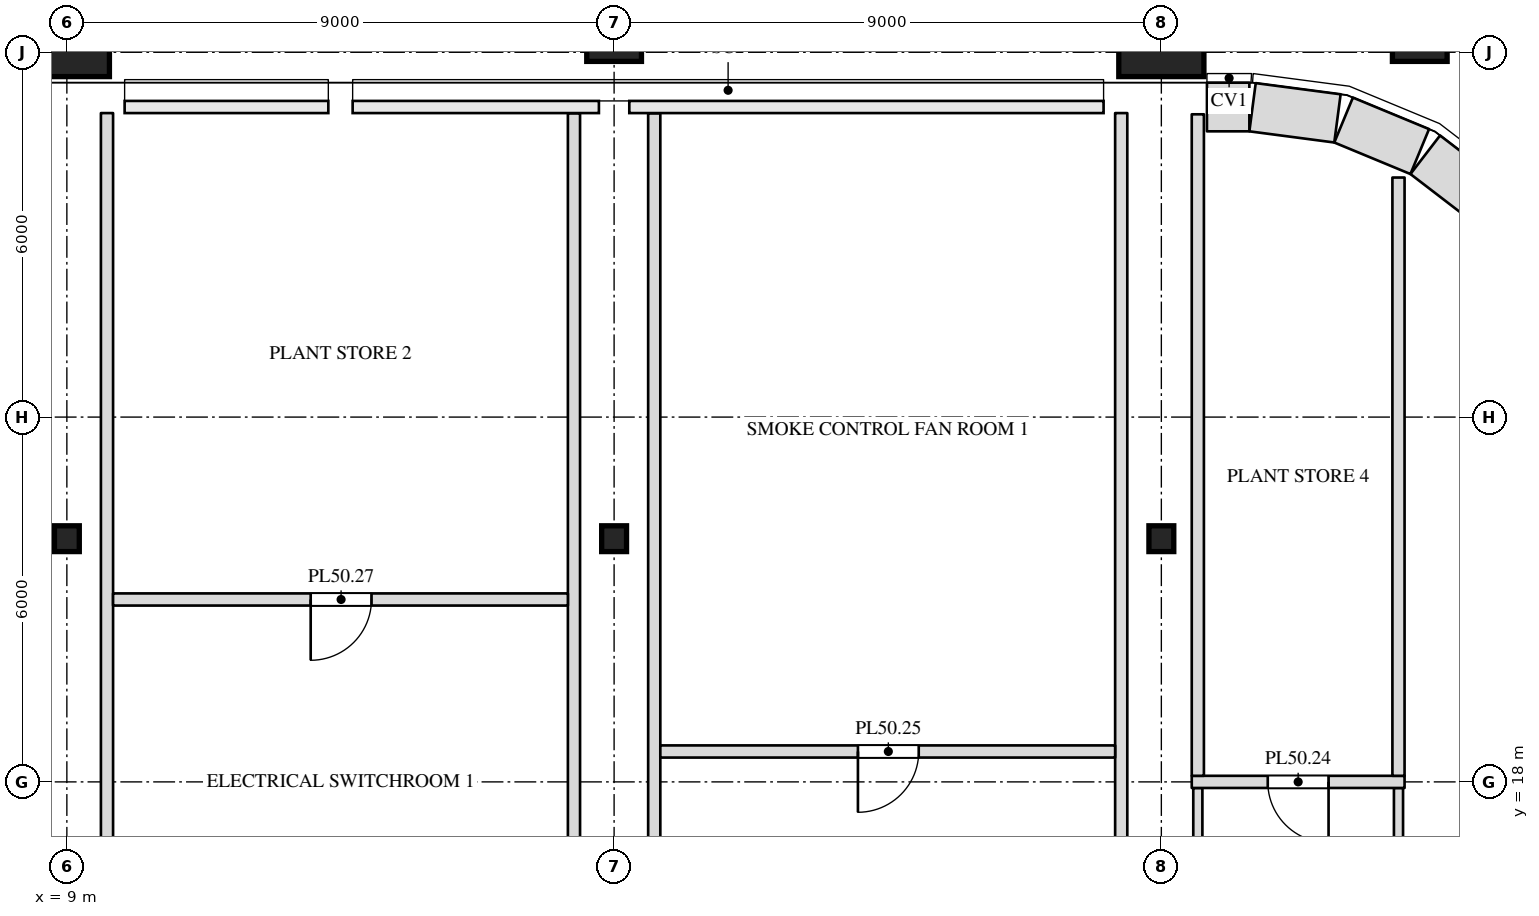
"""IFC4 building model, lengths in metres.
Left out: names, types, materials, properties, quantities, classifications, styles, units other than length and angle.
Written with IfcOpenShell. Run it as: python <this file> out.ifc"""

import sys

from ifc_helpers import new_model, si_unit, direction, frame, frame_2d, origin, origin_2d, place, context, subcontext, project, spatial, rectangle, i_section, extrude, clip, halfspace, element, fill, save


model = new_model("IFC4")
c1 = context("Model", 3, precision=1e-05, world=origin(), true_north=direction((0.0, 1.0)))
c2 = subcontext(c1, "Body", "Model", "MODEL_VIEW")
j1 = project(units=[si_unit("LENGTHUNIT", "METRE"), si_unit("PLANEANGLEUNIT", "RADIAN")], contexts=[c1])
p1 = place(None, origin())
s1 = spatial("IfcSite", under=j1, at=p1, CompositionType="ELEMENT")
p2 = place(p1, origin())
s2 = spatial("IfcBuilding", under=s1, at=p2, CompositionType="ELEMENT")
p3 = place(p2, frame((0.0, 0.0, 216.5)))
s3 = spatial("IfcBuildingStorey", under=s2, at=p3, CompositionType="ELEMENT", Elevation=216.5)
for number, where, z_axis, x_axis in (
    (1, (9.0, 22.0, 0.0), (0.0, 0.0, 1.0), (1.0, 0.0, 0.0)),
    (2, (18.0, 22.0, 0.0), (0.0, 0.0, 1.0), (1.0, 0.0, 0.0)),
    (3, (27.0, 22.0, 0.0), (0.0, 0.0, 1.0), (1.0, 0.0, 0.0)),
):
    element("IfcColumn", number, at=place(p3, frame(where, z_axis=z_axis, x_axis=x_axis)), inside=s3, PredefinedType="COLUMN", context=c2, shape_type="SweptSolid", body=[
        extrude(i_section(OverallWidth=0.409, OverallDepth=0.424, WebThickness=0.033, FlangeThickness=0.052, at=origin_2d()), origin(), (0.0, 0.0, 1.0), 4.0),
    ])
p4 = place(p3, frame((9.0, 30.0, 0.0), z_axis=(0.0, 0.242535625036, 0.970142500145), x_axis=(-1.0, 0.0, 0.0)))
e4 = element("IfcColumn", 4, at=p4, inside=s3, PredefinedType="COLUMN", context=c2, shape_type="Clipping", body=[
    clip(extrude(rectangle(XDim=1.4, YDim=1.4, at=origin_2d()), origin(), (0.0, 0.0, 1.0), 4.123), halfspace(frame((0.0, 0.0, 3.948)), False)),
])
p5 = place(p3, frame((18.0, 30.0, 0.0), z_axis=(0.0, 0.242535625036, 0.970142500145), x_axis=(-1.0, 0.0, 0.0)))
e5 = element("IfcColumn", 5, at=p5, inside=s3, PredefinedType="COLUMN", context=c2, shape_type="Clipping", body=[
    clip(extrude(rectangle(XDim=0.9, YDim=0.9, at=origin_2d()), origin(), (0.0, 0.0, 1.0), 4.123), halfspace(frame((0.0, 0.0, 4.01)), False)),
])
p6 = place(p3, frame((27.0, 30.0, 0.0), z_axis=(0.0, 0.242535625036, 0.970142500145), x_axis=(-1.0, 0.0, 0.0)))
e6 = element("IfcColumn", 6, at=p6, inside=s3, PredefinedType="COLUMN", context=c2, shape_type="Clipping", body=[
    clip(extrude(rectangle(XDim=1.4, YDim=1.4, at=origin_2d()), origin(), (0.0, 0.0, 1.0), 4.123), halfspace(frame((0.0, 0.0, 3.948)), False)),
])
p7 = place(p3, frame((31.25, 30.0, 0.0), z_axis=(0.0, 0.242535625036, 0.970142500145), x_axis=(-1.0, 0.0, 0.0)))
e7 = element("IfcColumn", 7, at=p7, inside=s3, PredefinedType="COLUMN", context=c2, shape_type="Clipping", body=[
    clip(extrude(rectangle(XDim=0.9, YDim=0.9, at=origin_2d()), origin(), (0.0, 0.0, 1.0), 4.123), halfspace(frame((0.0, 0.0, 4.01)), False)),
])
p8 = place(p3, frame((9.66, 0.5, 0.0), z_axis=(0.0, 0.0, 1.0), x_axis=(0.0, 1.0, 0.0)))
e8 = element("IfcWall", 8, at=p8, inside=s3, PredefinedType="PARTITIONING", context=c2, shape_type="SweptSolid", body=[
    extrude(rectangle(XDim=28.5, YDim=0.2, at=frame_2d((14.25, 0.0))), origin(), (0.0, 0.0, 1.0), 3.8),
])
for number, where, z_axis, x_axis in (
    (9, (17.34, 0.5, 0.0), (0.0, 0.0, 1.0), (0.0, 1.0, 0.0)),
    (10, (18.66, 0.5, 0.0), (0.0, 0.0, 1.0), (0.0, 1.0, 0.0)),
):
    element("IfcWall", number, at=place(p3, frame(where, z_axis=z_axis, x_axis=x_axis)), inside=s3, PredefinedType="PARTITIONING", context=c2, shape_type="SweptSolid", body=[
        extrude(rectangle(XDim=28.496, YDim=0.2, at=frame_2d((14.248, 0.0))), origin(), (0.0, 0.0, 1.0), 3.8),
    ])
p9 = place(p3, frame((26.34, 0.5, 0.0), z_axis=(0.0, 0.0, 1.0), x_axis=(0.0, 1.0, 0.0)))
e11 = element("IfcWall", 11, at=p9, inside=s3, PredefinedType="PARTITIONING", context=c2, shape_type="SweptSolid", body=[
    extrude(rectangle(XDim=28.5, YDim=0.2, at=frame_2d((14.25, 0.0))), origin(), (0.0, 0.0, 1.0), 3.8),
])
for number, where, z_axis, x_axis in (
    (12, (27.6, 0.475, 0.0), (0.0, 0.0, 1.0), (0.0, 1.0, 0.0)),
    (13, (30.9, 0.475, 0.0), (0.0, 0.0, 1.0), (0.0, 1.0, 0.0)),
):
    element("IfcWall", number, at=place(p3, frame(where, z_axis=z_axis, x_axis=x_axis)), inside=s3, PredefinedType="PARTITIONING", context=c2, shape_type="SweptSolid", body=[
        extrude(rectangle(XDim=17.425, YDim=0.15, at=frame_2d((8.712, 0.0))), origin(), (0.0, 0.0, 1.0), 3.8),
    ])
p10 = place(p3, frame((27.5, 18.0, 0.0), z_axis=(0.0, 0.0, 1.0), x_axis=(1.0, 0.0, 0.0)))
e14 = element("IfcWall", 14, at=p10, inside=s3, PredefinedType="PARTITIONING", context=c2, shape_type="SweptSolid", body=[
    extrude(rectangle(XDim=3.5, YDim=0.2, at=frame_2d((1.75, 0.0))), origin(), (0.0, 0.0, 1.0), 3.2),
])
p11 = place(p10, frame((1.25, 0.0, 0.0)))
e15 = element("IfcOpeningElement", 15, at=p11, cuts=e14, PredefinedType="OPENING", context=c2, shape_type="SweptSolid", body=[
    extrude(rectangle(XDim=1.0, YDim=2.1, at=frame_2d((0.5, 1.05))), frame((0.0, 0.112, 0.0), z_axis=(0.0, -1.0, 0.0), x_axis=(1.0, 0.0, 0.0)), (0.0, 0.0, 1.0), 0.224),
])
p12 = place(p3, frame((27.6, 18.1, 0.0), z_axis=(0.0, 0.0, 1.0), x_axis=(0.0, 1.0, 0.0)))
e16 = element("IfcWall", 16, at=p12, inside=s3, PredefinedType="PARTITIONING", context=c2, shape_type="SweptSolid", body=[
    extrude(rectangle(XDim=10.88, YDim=0.2, at=frame_2d((5.44, 0.0))), origin(), (0.0, 0.0, 1.0), 3.8),
])
p13 = place(p3, frame((30.9, 18.1, 0.0), z_axis=(0.0, 0.0, 1.0), x_axis=(0.0, 1.0, 0.0)))
e17 = element("IfcWall", 17, at=p13, inside=s3, PredefinedType="PARTITIONING", context=c2, shape_type="SweptSolid", body=[
    extrude(rectangle(XDim=9.84, YDim=0.2, at=frame_2d((4.92, 0.0))), origin(), (0.0, 0.0, 1.0), 3.8),
])
p14 = place(p3, frame((18.76, 18.5, 0.0), z_axis=(0.0, 0.0, 1.0), x_axis=(1.0, 0.0, 0.0)))
e18 = element("IfcWall", 18, at=p14, inside=s3, PredefinedType="PARTITIONING", context=c2, shape_type="SweptSolid", body=[
    extrude(rectangle(XDim=7.48, YDim=0.2, at=frame_2d((3.74, 0.0))), origin(), (0.0, 0.0, 1.0), 3.8),
])
p15 = place(p14, frame((3.25, 0.0, 0.0)))
e19 = element("IfcOpeningElement", 19, at=p15, cuts=e18, PredefinedType="OPENING", context=c2, shape_type="SweptSolid", body=[
    extrude(rectangle(XDim=1.0, YDim=2.1, at=frame_2d((0.5, 1.05))), frame((0.0, 0.112, 0.0), z_axis=(0.0, -1.0, 0.0), x_axis=(1.0, 0.0, 0.0)), (0.0, 0.0, 1.0), 0.224),
])
p16 = place(p3, frame((9.76, 21.0, 0.0), z_axis=(0.0, 0.0, 1.0), x_axis=(1.0, 0.0, 0.0)))
e20 = element("IfcWall", 20, at=p16, inside=s3, PredefinedType="PARTITIONING", context=c2, shape_type="SweptSolid", body=[
    extrude(rectangle(XDim=7.48, YDim=0.2, at=frame_2d((3.74, 0.0))), origin(), (0.0, 0.0, 1.0), 3.8),
])
p17 = place(p16, frame((3.25, 0.0, 0.0)))
e21 = element("IfcOpeningElement", 21, at=p17, cuts=e20, PredefinedType="OPENING", context=c2, shape_type="SweptSolid", body=[
    extrude(rectangle(XDim=1.0, YDim=2.1, at=frame_2d((0.5, 1.05))), frame((0.0, 0.112, 0.0), z_axis=(0.0, -1.0, 0.0), x_axis=(1.0, 0.0, 0.0)), (0.0, 0.0, 1.0), 0.224),
])
p18 = place(p3, frame((32.416, 27.489, 0.0), z_axis=(0.0, 0.0, 1.0), x_axis=(-0.793272915452, 0.608866226366, 0.0)))
e22 = element("IfcWall", 22, at=p18, inside=s3, PredefinedType="SOLIDWALL", context=c2, shape_type="SweptSolid", body=[
    extrude(rectangle(XDim=1.356, YDim=0.8, at=frame_2d((0.678, 0.0))), origin(), (0.0, 0.0, 1.0), 3.8),
])
p19 = place(p3, frame((31.25, 28.367, 0.0), z_axis=(0.0, 0.0, 1.0), x_axis=(-0.923847774587, 0.38276009378, 0.0)))
e23 = element("IfcWall", 23, at=p19, inside=s3, PredefinedType="SOLIDWALL", context=c2, shape_type="SweptSolid", body=[
    extrude(rectangle(XDim=1.355, YDim=0.8, at=frame_2d((0.678, 0.0))), origin(), (0.0, 0.0, 1.0), 3.8),
])
p20 = place(p3, frame((29.896, 28.913, 0.0), z_axis=(0.0, 0.0, 1.0), x_axis=(-0.99144603414, 0.130517283865, 0.0)))
e24 = element("IfcWall", 24, at=p20, inside=s3, PredefinedType="SOLIDWALL", context=c2, shape_type="SweptSolid", body=[
    extrude(rectangle(XDim=1.408, YDim=0.8, at=frame_2d((0.704, 0.0))), origin(), (0.0, 0.0, 1.0), 3.8),
])
p21 = place(p3, frame((28.448, 29.1, 0.0), z_axis=(0.0, 0.0, 1.0), x_axis=(-1.0, 0.0, 0.0)))
e25 = element("IfcWall", 25, at=p21, inside=s3, PredefinedType="SOLIDWALL", context=c2, shape_type="SweptSolid", body=[
    extrude(rectangle(XDim=0.698, YDim=0.8, at=frame_2d((0.349, 0.0))), origin(), (0.0, 0.0, 1.0), 3.8),
])
p22 = place(p11, origin())
e26 = element("IfcDoor", 26, at=p22, inside=s3, OperationType="SINGLE_SWING_LEFT", PredefinedType="DOOR", context=c2, shape_type="SweptSolid", body=[
    extrude(rectangle(XDim=1.0, YDim=2.1, at=frame_2d((0.5, 1.05))), frame((0.0, 0.025, 0.0), z_axis=(0.0, -1.0, 0.0), x_axis=(1.0, 0.0, 0.0)), (0.0, 0.0, 1.0), 0.05),
])
fill(e15, e26)
p23 = place(p15, origin())
e27 = element("IfcDoor", 27, at=p23, inside=s3, OperationType="SINGLE_SWING_RIGHT", PredefinedType="DOOR", context=c2, shape_type="SweptSolid", body=[
    extrude(rectangle(XDim=1.0, YDim=2.1, at=frame_2d((0.5, 1.05))), frame((0.0, 0.025, 0.0), z_axis=(0.0, -1.0, 0.0), x_axis=(1.0, 0.0, 0.0)), (0.0, 0.0, 1.0), 0.05),
])
fill(e19, e27)
p24 = place(p17, origin())
e28 = element("IfcDoor", 28, at=p24, inside=s3, OperationType="SINGLE_SWING_RIGHT", PredefinedType="DOOR", context=c2, shape_type="SweptSolid", body=[
    extrude(rectangle(XDim=1.0, YDim=2.1, at=frame_2d((0.5, 1.05))), frame((0.0, 0.025, 0.0), z_axis=(0.0, -1.0, 0.0), x_axis=(1.0, 0.0, 0.0)), (0.0, 0.0, 1.0), 0.05),
])
fill(e21, e28)
save(model, sys.argv[1])
